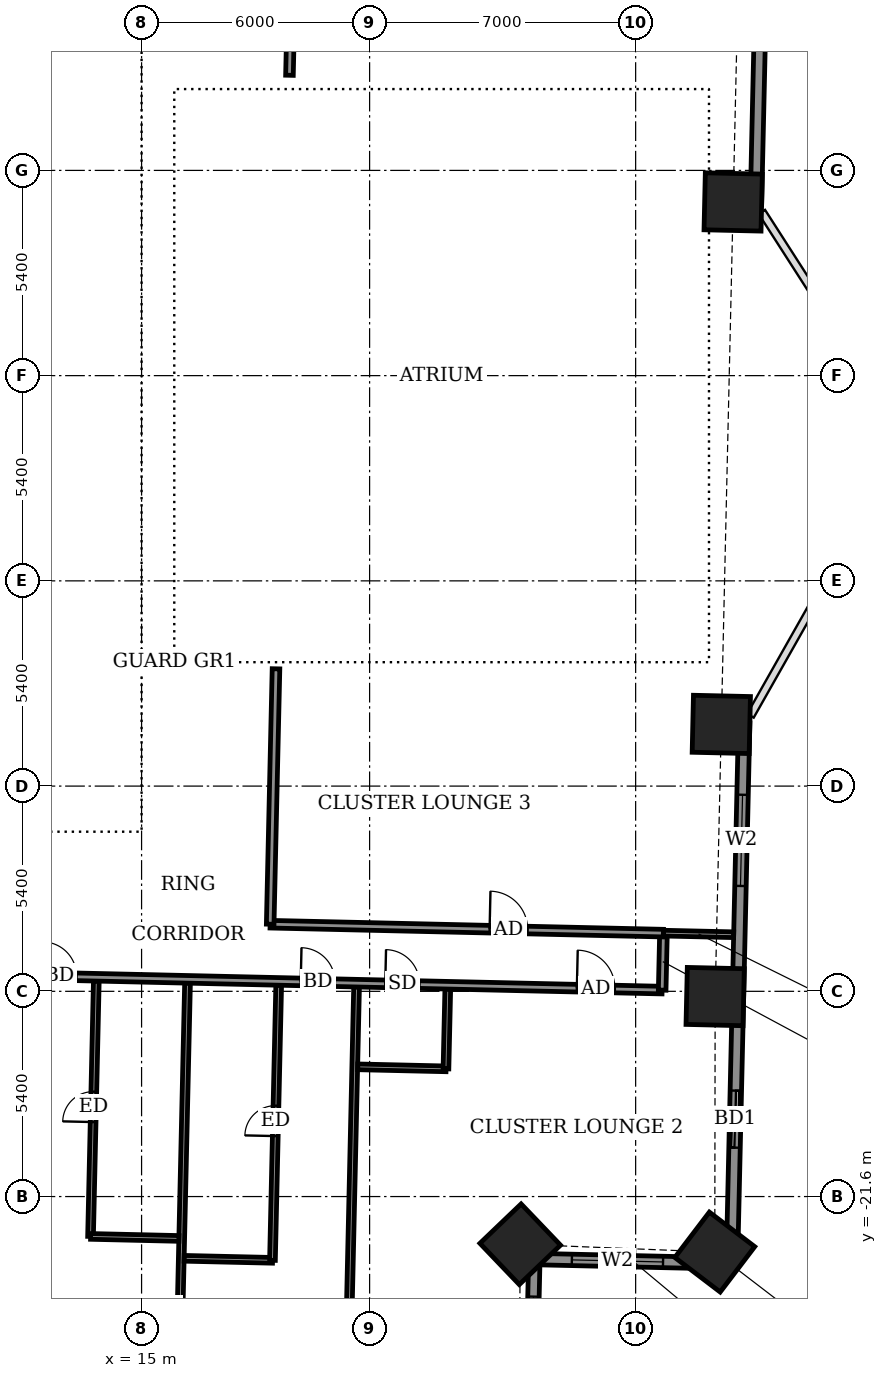
"""IFC4 building model, lengths in metres.
Left out: names, types, materials, properties, quantities, classifications, styles, units other than length and angle.
Written with IfcOpenShell. Run it as: python <this file> out.ifc"""

import sys

from ifc_helpers import new_model, si_unit, direction, frame, frame_2d, origin, origin_2d, place, context, subcontext, project, spatial, rectangle, extrude, element, fill, save


model = new_model("IFC4")
c1 = context("Model", 3, precision=1e-05, world=origin(), true_north=direction((0.0, 1.0)))
c2 = subcontext(c1, "Body", "Model", "MODEL_VIEW")
j1 = project(units=[si_unit("LENGTHUNIT", "METRE"), si_unit("PLANEANGLEUNIT", "RADIAN")], contexts=[c1])
p1 = place(None, origin())
s1 = spatial("IfcSite", under=j1, at=p1, CompositionType="ELEMENT")
p2 = place(p1, origin())
s2 = spatial("IfcBuilding", under=s1, at=p2, CompositionType="ELEMENT")
p3 = place(p2, frame((0.0, 0.0, 60.3)))
s3 = spatial("IfcBuildingStorey", under=s2, at=p3, CompositionType="ELEMENT", Elevation=60.3)
for number, where, z_axis, x_axis in (
    (1, (24.963, -22.855, -0.55), (0.0, 0.0, 1.0), (0.723, 0.691, 0.0)),
    (2, (30.082, -23.061, -0.55), (0.0, 0.0, 1.0), (0.606, 0.796, 0.0)),
    (3, (30.092, -16.338, -0.55), (0.0, 0.0, 1.0), (0.023, 1.0, 0.0)),
    (4, (30.254, -9.177, -0.55), (0.0, 0.0, 1.0), (0.023, 1.0, 0.0)),
    (5, (30.566, 4.57, -0.55), (0.0, 0.0, 1.0), (0.023, 1.0, 0.0)),
):
    element("IfcColumn", number, at=place(p3, frame(where, z_axis=z_axis, x_axis=x_axis)), inside=s3, PredefinedType="COLUMN", context=c2, shape_type="SweptSolid", body=[
        extrude(rectangle(XDim=1.5, YDim=1.5, at=origin_2d()), origin(), (0.0, 0.0, 1.0), 3.6),
    ])
p4 = place(p3, frame((30.533, -23.362, 0.0), z_axis=(0.0, 0.0, 1.0), x_axis=(0.022698800888, 0.999742349027, 0.0)))
e6 = element("IfcWall", 6, at=p4, inside=s3, PredefinedType="SOLIDWALL", context=c2, shape_type="SweptSolid", body=[
    extrude(rectangle(XDim=14.23, YDim=0.3, at=frame_2d((7.115, 0.0))), origin(), (0.0, 0.0, 1.0), 3.05),
])
p5 = place(p4, frame((3.05, 0.0, 0.0)))
e7 = element("IfcOpeningElement", 7, at=p5, cuts=e6, PredefinedType="OPENING", context=c2, shape_type="SweptSolid", body=[
    extrude(rectangle(XDim=1.5, YDim=2.4, at=frame_2d((0.75, 1.2))), frame((0.0, 0.16, 0.0), z_axis=(0.0, -1.0, 0.0), x_axis=(1.0, 0.0, 0.0)), (0.0, 0.0, 1.0), 0.32),
])
p6 = place(p4, frame((9.937, 0.0, 0.9)))
e8 = element("IfcOpeningElement", 8, at=p6, cuts=e6, PredefinedType="OPENING", context=c2, shape_type="SweptSolid", body=[
    extrude(rectangle(XDim=2.4, YDim=1.5, at=frame_2d((1.2, 0.75))), frame((0.0, 0.16, 0.0), z_axis=(0.0, -1.0, 0.0), x_axis=(1.0, 0.0, 0.0)), (0.0, 0.0, 1.0), 0.32),
])
p7 = place(p3, frame((31.165, 4.502, 0.0), z_axis=(0.0, 0.0, 1.0), x_axis=(0.022716307128, 0.999741951401, 0.0)))
e9 = element("IfcWall", 9, at=p7, inside=s3, PredefinedType="SOLIDWALL", context=c2, shape_type="SweptSolid", body=[
    extrude(rectangle(XDim=15.229, YDim=0.3, at=frame_2d((7.615, 0.0))), origin(), (0.0, 0.0, 1.0), 3.05),
])
p8 = place(p7, frame((6.072, 0.0, 0.9)))
e10 = element("IfcOpeningElement", 10, at=p8, cuts=e9, PredefinedType="OPENING", context=c2, shape_type="SweptSolid", body=[
    extrude(rectangle(XDim=0.9, YDim=1.5, at=frame_2d((0.45, 0.75))), frame((0.0, 0.16, 0.0), z_axis=(0.0, -1.0, 0.0), x_axis=(1.0, 0.0, 0.0)), (0.0, 0.0, 1.0), 0.32),
])
p9 = place(p7, frame((11.684, 0.0, 0.0)))
e11 = element("IfcOpeningElement", 11, at=p9, cuts=e9, PredefinedType="OPENING", context=c2, shape_type="SweptSolid", body=[
    extrude(rectangle(XDim=1.5, YDim=2.4, at=frame_2d((0.75, 1.2))), frame((0.0, 0.16, 0.0), z_axis=(0.0, -1.0, 0.0), x_axis=(1.0, 0.0, 0.0)), (0.0, 0.0, 1.0), 0.32),
])
p10 = place(p3, frame((25.216, -28.443, 0.0), z_axis=(0.0, 0.0, 1.0), x_axis=(0.022674484462, 0.999742900827, 0.0)))
e12 = element("IfcWall", 12, at=p10, inside=s3, PredefinedType="SOLIDWALL", context=c2, shape_type="SweptSolid", body=[
    extrude(rectangle(XDim=5.2, YDim=0.3, at=frame_2d((2.6, 0.0))), origin(), (0.0, 0.0, 1.0), 2.55),
])
p11 = place(p10, frame((1.811, 0.0, 0.9)))
e13 = element("IfcOpeningElement", 13, at=p11, cuts=e12, PredefinedType="OPENING", context=c2, shape_type="SweptSolid", body=[
    extrude(rectangle(XDim=2.4, YDim=1.5, at=frame_2d((1.2, 0.75))), frame((0.0, 0.16, 0.0), z_axis=(0.0, -1.0, 0.0), x_axis=(1.0, 0.0, 0.0)), (0.0, 0.0, 1.0), 0.32),
])
p12 = place(p3, frame((25.334, -23.244, 0.0), z_axis=(0.0, 0.0, 1.0), x_axis=(0.999741811307, -0.022722471786, 0.0)))
e14 = element("IfcWall", 14, at=p12, inside=s3, PredefinedType="SOLIDWALL", context=c2, shape_type="SweptSolid", body=[
    extrude(rectangle(XDim=5.2, YDim=0.3, at=frame_2d((2.6, 0.0))), origin(), (0.0, 0.0, 1.0), 2.55),
])
p13 = place(p12, frame((0.988, 0.0, 0.9)))
e15 = element("IfcOpeningElement", 15, at=p13, cuts=e14, PredefinedType="OPENING", context=c2, shape_type="SweptSolid", body=[
    extrude(rectangle(XDim=2.4, YDim=1.5, at=frame_2d((1.2, 0.75))), frame((0.0, 0.16, 0.0), z_axis=(0.0, -1.0, 0.0), x_axis=(1.0, 0.0, 0.0)), (0.0, 0.0, 1.0), 0.32),
])
p14 = place(p3, frame((15.934, -28.082, 0.0), z_axis=(0.0, 0.0, 1.0), x_axis=(0.022719113715, 0.999741887625, 0.0)))
e16 = element("IfcWall", 16, at=p14, inside=s3, PredefinedType="PARTITIONING", context=c2, shape_type="SweptSolid", body=[
    extrude(rectangle(XDim=12.1, YDim=0.15, at=frame_2d((6.05, 0.0))), origin(), (0.0, 0.0, 1.0), 2.55),
])
p15 = place(p3, frame((20.383, -28.183, 0.0), z_axis=(0.0, 0.0, 1.0), x_axis=(0.022637991173, 0.99974372784, 0.0)))
e17 = element("IfcWall", 17, at=p15, inside=s3, PredefinedType="PARTITIONING", context=c2, shape_type="SweptSolid", body=[
    extrude(rectangle(XDim=12.1, YDim=0.15, at=frame_2d((6.05, 0.0))), origin(), (0.0, 0.0, 1.0), 2.55),
])
p16 = place(p3, frame((16.121, -23.225, 0.0), z_axis=(0.0, 0.0, 1.0), x_axis=(0.999740478815, -0.022781023197, 0.0)))
e18 = element("IfcWall", 18, at=p16, inside=s3, PredefinedType="PARTITIONING", context=c2, shape_type="SweptSolid", body=[
    extrude(rectangle(XDim=2.325, YDim=0.15, at=frame_2d((1.163, 0.0))), origin(), (0.0, 0.0, 1.0), 3.05),
])
p17 = place(p3, frame((18.444, -23.278, 0.0), z_axis=(0.0, 0.0, 1.0), x_axis=(0.022627186748, 0.999743972435, 0.0)))
e19 = element("IfcWall", 19, at=p17, inside=s3, PredefinedType="PARTITIONING", context=c2, shape_type="SweptSolid", body=[
    extrude(rectangle(XDim=7.24, YDim=0.15, at=frame_2d((3.62, 0.0))), origin(), (0.0, 0.0, 1.0), 3.05),
])
p18 = place(p17, frame((3.27, 0.0, 0.0)))
e20 = element("IfcOpeningElement", 20, at=p18, cuts=e19, PredefinedType="OPENING", context=c2, shape_type="SweptSolid", body=[
    extrude(rectangle(XDim=0.8, YDim=2.1, at=frame_2d((0.4, 1.05))), frame((0.0, 0.085, 0.0), z_axis=(0.0, -1.0, 0.0), x_axis=(1.0, 0.0, 0.0)), (0.0, 0.0, 1.0), 0.17),
])
p19 = place(p3, frame((13.657, -22.649, 0.0), z_axis=(0.0, 0.0, 1.0), x_axis=(0.022634748998, 0.99974380125, 0.0)))
e21 = element("IfcWall", 21, at=p19, inside=s3, PredefinedType="PARTITIONING", context=c2, shape_type="SweptSolid", body=[
    extrude(rectangle(XDim=6.72, YDim=0.15, at=frame_2d((3.36, 0.0))), origin(), (0.0, 0.0, 1.0), 3.05),
])
p20 = place(p19, frame((3.01, 0.0, 0.0)))
e22 = element("IfcOpeningElement", 22, at=p20, cuts=e21, PredefinedType="OPENING", context=c2, shape_type="SweptSolid", body=[
    extrude(rectangle(XDim=0.8, YDim=2.1, at=frame_2d((0.4, 1.05))), frame((0.0, 0.085, 0.0), z_axis=(0.0, -1.0, 0.0), x_axis=(1.0, 0.0, 0.0)), (0.0, 0.0, 1.0), 0.17),
])
for number, where, z_axis, x_axis in (
    (23, (13.659, -22.649, 0.0), (0.0, 0.0, 1.0), (1.0, -0.023, 0.0)),
    (24, (20.687, -18.187, 0.0), (0.0, 0.0, 1.0), (1.0, -0.023, 0.0)),
):
    element("IfcWall", number, at=place(p3, frame(where, z_axis=z_axis, x_axis=x_axis)), inside=s3, PredefinedType="PARTITIONING", context=c2, shape_type="SweptSolid", body=[
        extrude(rectangle(XDim=2.324, YDim=0.15, at=frame_2d((1.162, 0.0))), origin(), (0.0, 0.0, 1.0), 3.05),
    ])
p21 = place(p3, frame((23.009, -18.24, 0.0), z_axis=(0.0, 0.0, 1.0), x_axis=(0.022792727877, 0.999740212033, 0.0)))
e25 = element("IfcWall", 25, at=p21, inside=s3, PredefinedType="PARTITIONING", context=c2, shape_type="SweptSolid", body=[
    extrude(rectangle(XDim=2.099, YDim=0.15, at=frame_2d((1.05, 0.0))), origin(), (0.0, 0.0, 1.0), 3.05),
])
p22 = place(p3, frame((-26.126, -14.924, 0.0), z_axis=(0.0, 0.0, 1.0), x_axis=(0.999742687583, -0.0226838847, 0.0)))
e26 = element("IfcWall", 26, at=p22, inside=s3, PredefinedType="PARTITIONING", context=c2, shape_type="SweptSolid", body=[
    extrude(rectangle(XDim=54.836, YDim=0.2, at=frame_2d((27.418, 0.0))), origin(), (0.0, 0.0, 1.0), 3.05),
])
p23 = place(p22, frame((0.775, 0.0, 0.0)))
e27 = element("IfcOpeningElement", 27, at=p23, cuts=e26, PredefinedType="OPENING", context=c2, shape_type="SweptSolid", body=[
    extrude(rectangle(XDim=1.0, YDim=2.1, at=frame_2d((0.5, 1.05))), frame((0.0, 0.11, 0.0), z_axis=(0.0, -1.0, 0.0), x_axis=(1.0, 0.0, 0.0)), (0.0, 0.0, 1.0), 0.22),
])
p24 = place(p22, frame((5.45, 0.0, 0.0)))
e28 = element("IfcOpeningElement", 28, at=p24, cuts=e26, PredefinedType="OPENING", context=c2, shape_type="SweptSolid", body=[
    extrude(rectangle(XDim=0.9, YDim=2.1, at=frame_2d((0.45, 1.05))), frame((0.0, 0.11, 0.0), z_axis=(0.0, -1.0, 0.0), x_axis=(1.0, 0.0, 0.0)), (0.0, 0.0, 1.0), 0.22),
])
p25 = place(p22, frame((10.0, 0.0, 0.0)))
e29 = element("IfcOpeningElement", 29, at=p25, cuts=e26, PredefinedType="OPENING", context=c2, shape_type="SweptSolid", body=[
    extrude(rectangle(XDim=0.9, YDim=2.1, at=frame_2d((0.45, 1.05))), frame((0.0, 0.11, 0.0), z_axis=(0.0, -1.0, 0.0), x_axis=(1.0, 0.0, 0.0)), (0.0, 0.0, 1.0), 0.22),
])
p26 = place(p22, frame((11.975, 0.0, 0.0)))
e30 = element("IfcOpeningElement", 30, at=p26, cuts=e26, PredefinedType="OPENING", context=c2, shape_type="SweptSolid", body=[
    extrude(rectangle(XDim=0.9, YDim=2.1, at=frame_2d((0.45, 1.05))), frame((0.0, 0.11, 0.0), z_axis=(0.0, -1.0, 0.0), x_axis=(1.0, 0.0, 0.0)), (0.0, 0.0, 1.0), 0.22),
])
p27 = place(p22, frame((18.85, 0.0, 0.0)))
e31 = element("IfcOpeningElement", 31, at=p27, cuts=e26, PredefinedType="OPENING", context=c2, shape_type="SweptSolid", body=[
    extrude(rectangle(XDim=0.9, YDim=2.1, at=frame_2d((0.45, 1.05))), frame((0.0, 0.11, 0.0), z_axis=(0.0, -1.0, 0.0), x_axis=(1.0, 0.0, 0.0)), (0.0, 0.0, 1.0), 0.22),
])
p28 = place(p22, frame((20.9, 0.0, 0.0)))
e32 = element("IfcOpeningElement", 32, at=p28, cuts=e26, PredefinedType="OPENING", context=c2, shape_type="SweptSolid", body=[
    extrude(rectangle(XDim=0.9, YDim=2.1, at=frame_2d((0.45, 1.05))), frame((0.0, 0.11, 0.0), z_axis=(0.0, -1.0, 0.0), x_axis=(1.0, 0.0, 0.0)), (0.0, 0.0, 1.0), 0.22),
])
p29 = place(p22, frame((27.725, 0.0, 0.0)))
e33 = element("IfcOpeningElement", 33, at=p29, cuts=e26, PredefinedType="OPENING", context=c2, shape_type="SweptSolid", body=[
    extrude(rectangle(XDim=0.9, YDim=2.1, at=frame_2d((0.45, 1.05))), frame((0.0, 0.11, 0.0), z_axis=(0.0, -1.0, 0.0), x_axis=(1.0, 0.0, 0.0)), (0.0, 0.0, 1.0), 0.22),
])
p30 = place(p22, frame((29.7, 0.0, 0.0)))
e34 = element("IfcOpeningElement", 34, at=p30, cuts=e26, PredefinedType="OPENING", context=c2, shape_type="SweptSolid", body=[
    extrude(rectangle(XDim=0.9, YDim=2.1, at=frame_2d((0.45, 1.05))), frame((0.0, 0.11, 0.0), z_axis=(0.0, -1.0, 0.0), x_axis=(1.0, 0.0, 0.0)), (0.0, 0.0, 1.0), 0.22),
])
p31 = place(p22, frame((36.5, 0.0, 0.0)))
e35 = element("IfcOpeningElement", 35, at=p31, cuts=e26, PredefinedType="OPENING", context=c2, shape_type="SweptSolid", body=[
    extrude(rectangle(XDim=0.9, YDim=2.1, at=frame_2d((0.45, 1.05))), frame((0.0, 0.11, 0.0), z_axis=(0.0, -1.0, 0.0), x_axis=(1.0, 0.0, 0.0)), (0.0, 0.0, 1.0), 0.22),
])
p32 = place(p22, frame((38.525, 0.0, 0.0)))
e36 = element("IfcOpeningElement", 36, at=p32, cuts=e26, PredefinedType="OPENING", context=c2, shape_type="SweptSolid", body=[
    extrude(rectangle(XDim=0.9, YDim=2.1, at=frame_2d((0.45, 1.05))), frame((0.0, 0.11, 0.0), z_axis=(0.0, -1.0, 0.0), x_axis=(1.0, 0.0, 0.0)), (0.0, 0.0, 1.0), 0.22),
])
p33 = place(p22, frame((45.325, 0.0, 0.0)))
e37 = element("IfcOpeningElement", 37, at=p33, cuts=e26, PredefinedType="OPENING", context=c2, shape_type="SweptSolid", body=[
    extrude(rectangle(XDim=0.9, YDim=2.1, at=frame_2d((0.45, 1.05))), frame((0.0, 0.11, 0.0), z_axis=(0.0, -1.0, 0.0), x_axis=(1.0, 0.0, 0.0)), (0.0, 0.0, 1.0), 0.22),
])
p34 = place(p22, frame((52.593, 0.0, 0.0)))
e38 = element("IfcOpeningElement", 38, at=p34, cuts=e26, PredefinedType="OPENING", context=c2, shape_type="SweptSolid", body=[
    extrude(rectangle(XDim=1.0, YDim=2.1, at=frame_2d((0.5, 1.05))), frame((0.0, 0.11, 0.0), z_axis=(0.0, -1.0, 0.0), x_axis=(1.0, 0.0, 0.0)), (0.0, 0.0, 1.0), 0.22),
])
p35 = place(p22, frame((47.55, 0.0, 0.0)))
e39 = element("IfcOpeningElement", 39, at=p35, cuts=e26, PredefinedType="OPENING", context=c2, shape_type="SweptSolid", body=[
    extrude(rectangle(XDim=0.9, YDim=2.1, at=frame_2d((0.45, 1.05))), frame((0.0, 0.11, 0.0), z_axis=(0.0, -1.0, 0.0), x_axis=(1.0, 0.0, 0.0)), (0.0, 0.0, 1.0), 0.22),
])
p36 = place(p3, frame((28.698, -16.169, 0.0), z_axis=(0.0, 0.0, 1.0), x_axis=(0.022617910375, 0.999744182344, 0.0)))
e40 = element("IfcWall", 40, at=p36, inside=s3, PredefinedType="PARTITIONING", context=c2, shape_type="SweptSolid", body=[
    extrude(rectangle(XDim=1.5, YDim=0.2, at=frame_2d((0.75, 0.0))), origin(), (0.0, 0.0, 1.0), 3.05),
])
p37 = place(p3, frame((18.382, -14.434, 0.0), z_axis=(0.0, 0.0, 1.0), x_axis=(0.999742529177, -0.022690865001, 0.0)))
e41 = element("IfcWall", 41, at=p37, inside=s3, PredefinedType="PARTITIONING", context=c2, shape_type="SweptSolid", body=[
    extrude(rectangle(XDim=10.351, YDim=0.2, at=frame_2d((5.175, 0.0))), origin(), (0.0, 0.0, 1.0), 3.05),
])
p38 = place(p37, frame((5.777, 0.0, 0.0)))
e42 = element("IfcOpeningElement", 42, at=p38, cuts=e41, PredefinedType="OPENING", context=c2, shape_type="SweptSolid", body=[
    extrude(rectangle(XDim=1.0, YDim=2.1, at=frame_2d((0.5, 1.05))), frame((0.0, 0.11, 0.0), z_axis=(0.0, -1.0, 0.0), x_axis=(1.0, 0.0, 0.0)), (0.0, 0.0, 1.0), 0.22),
])
p39 = place(p3, frame((18.384, -14.434, 0.0), z_axis=(0.0, 0.0, 1.0), x_axis=(0.022773383809, 0.999740652864, 0.0)))
e43 = element("IfcWall", 43, at=p39, inside=s3, PredefinedType="PARTITIONING", context=c2, shape_type="SweptSolid", body=[
    extrude(rectangle(XDim=6.722, YDim=0.2, at=frame_2d((3.361, 0.0))), origin(), (0.0, 0.0, 1.0), 3.05),
])
p40 = place(p3, frame((28.73, -14.669, 0.0), z_axis=(0.0, 0.0, 1.0), x_axis=(0.999742244252, -0.022703415106, 0.0)))
e44 = element("IfcWall", 44, at=p40, inside=s3, PredefinedType="PARTITIONING", context=c2, shape_type="SweptSolid", body=[
    extrude(rectangle(XDim=1.85, YDim=0.15, at=frame_2d((0.925, 0.0))), origin(), (0.0, 0.0, 1.0), 2.55),
])
p41 = place(p3, frame((18.891, 7.903, 0.0), z_axis=(0.0, 0.0, 1.0), x_axis=(0.022807092041, 0.999739884446, 0.0)))
e45 = element("IfcWall", 45, at=p41, inside=s3, PredefinedType="PARTITIONING", context=c2, shape_type="SweptSolid", body=[
    extrude(rectangle(XDim=4.207, YDim=0.2, at=frame_2d((2.104, 0.0))), origin(), (0.0, 0.0, 1.0), 3.05),
])
p42 = place(p3, frame((-14.9, -11.35, 0.0), z_axis=(0.0, 0.0, 1.0), x_axis=(1.0, 0.0, 0.0)))
e46 = element("IfcWall", 46, at=p42, inside=s3, PredefinedType="SHEAR", context=c2, shape_type="SweptSolid", body=[
    extrude(rectangle(XDim=29.8, YDim=1.1, at=frame_2d((14.9, 0.0))), origin(), (0.0, 0.0, 1.0), 3.6),
])
p43 = place(p3, frame((14.35, -10.8, 0.0), z_axis=(0.0, 0.0, 1.0), x_axis=(0.0, 1.0, 0.0)))
e47 = element("IfcWall", 47, at=p43, inside=s3, PredefinedType="SHEAR", context=c2, shape_type="SweptSolid", body=[
    extrude(rectangle(XDim=21.6, YDim=1.1, at=frame_2d((10.8, 0.0))), origin(), (0.0, 0.0, 1.0), 3.6),
])
p44 = place(p43, frame((1.2, 0.0, 0.0)))
e48 = element("IfcOpeningElement", 48, at=p44, cuts=e47, PredefinedType="OPENING", context=c2, shape_type="SweptSolid", body=[
    extrude(rectangle(XDim=1.2, YDim=2.1, at=frame_2d((0.6, 1.05))), frame((0.0, 0.56, 0.0), z_axis=(0.0, -1.0, 0.0), x_axis=(1.0, 0.0, 0.0)), (0.0, 0.0, 1.0), 1.12),
])
p45 = place(p5, origin())
e49 = element("IfcDoor", 49, at=p45, inside=s3, OperationType="SLIDING_TO_LEFT", PredefinedType="DOOR", context=c2, shape_type="SweptSolid", body=[
    extrude(rectangle(XDim=1.5, YDim=2.4, at=frame_2d((0.75, 1.2))), frame((0.0, 0.025, 0.0), z_axis=(0.0, -1.0, 0.0), x_axis=(1.0, 0.0, 0.0)), (0.0, 0.0, 1.0), 0.05),
])
fill(e7, e49)
p46 = place(p6, origin())
e50 = element("IfcWindow", 50, at=p46, inside=s3, PartitioningType="DOUBLE_PANEL_VERTICAL", PredefinedType="WINDOW", context=c2, shape_type="SweptSolid", body=[
    extrude(rectangle(XDim=2.4, YDim=1.5, at=frame_2d((1.2, 0.75))), frame((0.0, 0.03, 0.0), z_axis=(0.0, -1.0, 0.0), x_axis=(1.0, 0.0, 0.0)), (0.0, 0.0, 1.0), 0.06),
])
fill(e8, e50)
p47 = place(p11, origin())
e51 = element("IfcWindow", 51, at=p47, inside=s3, PartitioningType="DOUBLE_PANEL_VERTICAL", PredefinedType="WINDOW", context=c2, shape_type="SweptSolid", body=[
    extrude(rectangle(XDim=2.4, YDim=1.5, at=frame_2d((1.2, 0.75))), frame((0.0, 0.03, 0.0), z_axis=(0.0, -1.0, 0.0), x_axis=(1.0, 0.0, 0.0)), (0.0, 0.0, 1.0), 0.06),
])
fill(e13, e51)
p48 = place(p13, origin())
e52 = element("IfcWindow", 52, at=p48, inside=s3, PartitioningType="DOUBLE_PANEL_VERTICAL", PredefinedType="WINDOW", context=c2, shape_type="SweptSolid", body=[
    extrude(rectangle(XDim=2.4, YDim=1.5, at=frame_2d((1.2, 0.75))), frame((0.0, 0.03, 0.0), z_axis=(0.0, -1.0, 0.0), x_axis=(1.0, 0.0, 0.0)), (0.0, 0.0, 1.0), 0.06),
])
fill(e15, e52)
p49 = place(p32, origin())
e53 = element("IfcDoor", 53, at=p49, inside=s3, OperationType="SINGLE_SWING_RIGHT", PredefinedType="DOOR", context=c2, shape_type="SweptSolid", body=[
    extrude(rectangle(XDim=0.9, YDim=2.1, at=frame_2d((0.45, 1.05))), frame((0.0, 0.025, 0.0), z_axis=(0.0, -1.0, 0.0), x_axis=(1.0, 0.0, 0.0)), (0.0, 0.0, 1.0), 0.05),
])
fill(e36, e53)
p50 = place(p20, origin())
e54 = element("IfcDoor", 54, at=p50, inside=s3, OperationType="SINGLE_SWING_RIGHT", PredefinedType="DOOR", context=c2, shape_type="SweptSolid", body=[
    extrude(rectangle(XDim=0.8, YDim=2.1, at=frame_2d((0.4, 1.05))), frame((0.0, 0.025, 0.0), z_axis=(0.0, -1.0, 0.0), x_axis=(1.0, 0.0, 0.0)), (0.0, 0.0, 1.0), 0.05),
])
fill(e22, e54)
p51 = place(p33, origin())
e55 = element("IfcDoor", 55, at=p51, inside=s3, OperationType="SINGLE_SWING_LEFT", PredefinedType="DOOR", context=c2, shape_type="SweptSolid", body=[
    extrude(rectangle(XDim=0.9, YDim=2.1, at=frame_2d((0.45, 1.05))), frame((0.0, 0.025, 0.0), z_axis=(0.0, -1.0, 0.0), x_axis=(1.0, 0.0, 0.0)), (0.0, 0.0, 1.0), 0.05),
])
fill(e37, e55)
p52 = place(p18, origin())
e56 = element("IfcDoor", 56, at=p52, inside=s3, OperationType="SINGLE_SWING_LEFT", PredefinedType="DOOR", context=c2, shape_type="SweptSolid", body=[
    extrude(rectangle(XDim=0.8, YDim=2.1, at=frame_2d((0.4, 1.05))), frame((0.0, 0.025, 0.0), z_axis=(0.0, -1.0, 0.0), x_axis=(1.0, 0.0, 0.0)), (0.0, 0.0, 1.0), 0.05),
])
fill(e20, e56)
p53 = place(p34, origin())
e57 = element("IfcDoor", 57, at=p53, inside=s3, OperationType="SINGLE_SWING_RIGHT", PredefinedType="DOOR", context=c2, shape_type="SweptSolid", body=[
    extrude(rectangle(XDim=1.0, YDim=2.1, at=frame_2d((0.5, 1.05))), frame((0.0, 0.025, 0.0), z_axis=(0.0, -1.0, 0.0), x_axis=(1.0, 0.0, 0.0)), (0.0, 0.0, 1.0), 0.05),
])
fill(e38, e57)
p54 = place(p35, origin())
e58 = element("IfcDoor", 58, at=p54, inside=s3, OperationType="SINGLE_SWING_RIGHT", PredefinedType="DOOR", context=c2, shape_type="SweptSolid", body=[
    extrude(rectangle(XDim=0.9, YDim=2.1, at=frame_2d((0.45, 1.05))), frame((0.0, 0.025, 0.0), z_axis=(0.0, -1.0, 0.0), x_axis=(1.0, 0.0, 0.0)), (0.0, 0.0, 1.0), 0.05),
])
fill(e39, e58)
p55 = place(p38, origin())
e59 = element("IfcDoor", 59, at=p55, inside=s3, OperationType="SINGLE_SWING_LEFT", PredefinedType="DOOR", context=c2, shape_type="SweptSolid", body=[
    extrude(rectangle(XDim=1.0, YDim=2.1, at=frame_2d((0.5, 1.05))), frame((0.0, 0.025, 0.0), z_axis=(0.0, -1.0, 0.0), x_axis=(1.0, 0.0, 0.0)), (0.0, 0.0, 1.0), 0.05),
])
fill(e42, e59)
p56 = place(p44, origin())
e60 = element("IfcDoor", 60, at=p56, inside=s3, OperationType="DOUBLE_DOOR_SINGLE_SWING", PredefinedType="DOOR", context=c2, shape_type="SweptSolid", body=[
    extrude(rectangle(XDim=1.2, YDim=2.1, at=frame_2d((0.6, 1.05))), frame((0.0, 0.025, 0.0), z_axis=(0.0, -1.0, 0.0), x_axis=(1.0, 0.0, 0.0)), (0.0, 0.0, 1.0), 0.05),
])
fill(e48, e60)
save(model, sys.argv[1])
